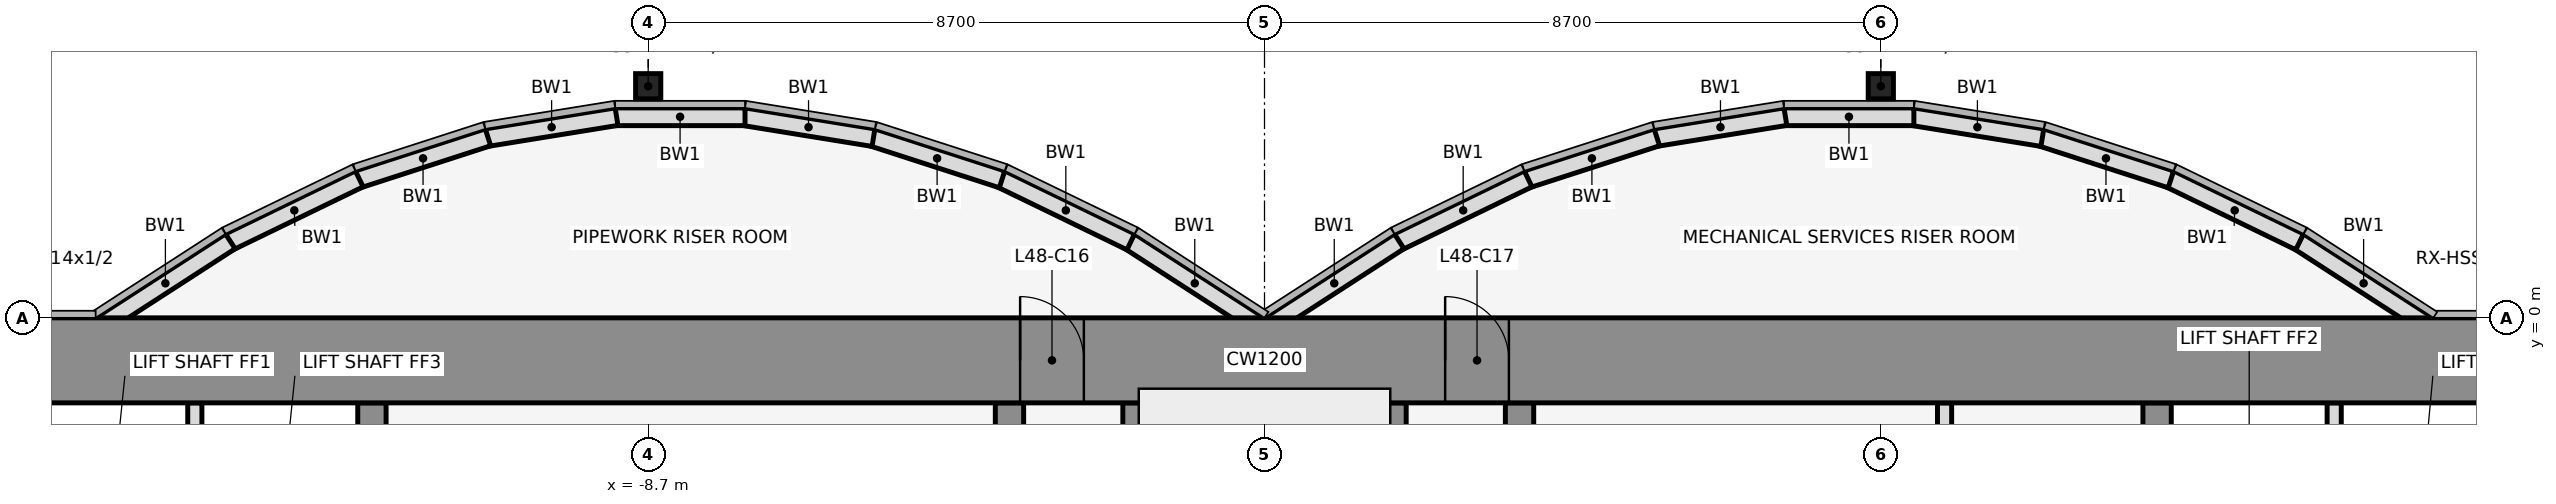
"""IFC4 building model, lengths in metres.
Left out: names, types, materials, properties, quantities, classifications, styles, units other than length and angle.
Written with IfcOpenShell. Run it as: python <this file> out.ifc"""

import sys

from ifc_helpers import new_model, si_unit, direction, frame, frame_2d, origin, origin_2d, place, context, subcontext, project, spatial, rectangle, hollow_rectangle, extrude, element, fill, save


model = new_model("IFC4")
c1 = context("Model", 3, precision=1e-05, world=origin(), true_north=direction((0.0, 1.0)))
c2 = subcontext(c1, "Body", "Model", "MODEL_VIEW")
j1 = project(units=[si_unit("LENGTHUNIT", "METRE"), si_unit("PLANEANGLEUNIT", "RADIAN")], contexts=[c1])
p1 = place(None, origin())
s1 = spatial("IfcSite", under=j1, at=p1, CompositionType="ELEMENT")
p2 = place(p1, origin())
s2 = spatial("IfcBuilding", under=s1, at=p2, CompositionType="ELEMENT")
p3 = place(p2, frame((0.0, 0.0, 215.5)))
s3 = spatial("IfcBuildingStorey", under=s2, at=p3, CompositionType="ELEMENT", Elevation=215.5)
for number, where, z_axis, x_axis in (
    (1, (-8.7, 3.269, 0.0), (0.0, 0.0, 1.0), (1.0, 0.0, 0.0)),
    (2, (8.7, 3.269, 0.0), (0.0, 0.0, 1.0), (1.0, 0.0, 0.0)),
):
    element("IfcColumn", number, at=place(p3, frame(where, z_axis=z_axis, x_axis=x_axis)), inside=s3, PredefinedType="COLUMN", context=c2, shape_type="SweptSolid", body=[
        extrude(hollow_rectangle(XDim=0.356, YDim=0.356, WallThickness=0.012, at=origin_2d()), origin(), (0.0, 0.0, 1.0), 4.1),
    ])
p4 = place(p3, frame((16.432, -0.105, 0.0), z_axis=(0.0, 0.0, 1.0), x_axis=(-0.83981312244, 0.542875602121, 0.0)))
e3 = element("IfcWall", 3, at=p4, inside=s3, PredefinedType="STANDARD", context=c2, shape_type="SweptSolid", body=[
    extrude(rectangle(XDim=2.183, YDim=0.25, at=frame_2d((1.091, 0.0))), origin(), (0.0, 0.0, 1.0), 3.95),
])
p5 = place(p3, frame((14.612, 1.073, 0.0), z_axis=(0.0, 0.0, 1.0), x_axis=(-0.89982408427, 0.436252928206, 0.0)))
e4 = element("IfcWall", 4, at=p5, inside=s3, PredefinedType="STANDARD", context=c2, shape_type="SweptSolid", body=[
    extrude(rectangle(XDim=2.038, YDim=0.25, at=frame_2d((1.019, 0.0))), origin(), (0.0, 0.0, 1.0), 3.95),
])
p6 = place(p3, frame((12.795, 1.955, 0.0), z_axis=(0.0, 0.0, 1.0), x_axis=(-0.951495806175, 0.307661714928, 0.0)))
e5 = element("IfcWall", 5, at=p6, inside=s3, PredefinedType="STANDARD", context=c2, shape_type="SweptSolid", body=[
    extrude(rectangle(XDim=1.927, YDim=0.25, at=frame_2d((0.963, 0.0))), origin(), (0.0, 0.0, 1.0), 3.95),
])
p7 = place(p3, frame((10.98, 2.543, 0.0), z_axis=(0.0, 0.0, 1.0), x_axis=(-0.987181718931, 0.159600293885, 0.0)))
e6 = element("IfcWall", 6, at=p7, inside=s3, PredefinedType="STANDARD", context=c2, shape_type="SweptSolid", body=[
    extrude(rectangle(XDim=1.857, YDim=0.25, at=frame_2d((0.929, 0.0))), origin(), (0.0, 0.0, 1.0), 3.95),
])
p8 = place(p3, frame((9.167, 2.838, 0.0), z_axis=(0.0, 0.0, 1.0), x_axis=(-1.0, 0.0, 0.0)))
e7 = element("IfcWall", 7, at=p8, inside=s3, PredefinedType="STANDARD", context=c2, shape_type="SweptSolid", body=[
    extrude(rectangle(XDim=1.833, YDim=0.25, at=frame_2d((0.917, 0.0))), origin(), (0.0, 0.0, 1.0), 3.95),
])
p9 = place(p3, frame((7.353, 2.84, 0.0), z_axis=(0.0, 0.0, 1.0), x_axis=(-0.987181718931, -0.159600293885, 0.0)))
e8 = element("IfcWall", 8, at=p9, inside=s3, PredefinedType="STANDARD", context=c2, shape_type="SweptSolid", body=[
    extrude(rectangle(XDim=1.857, YDim=0.25, at=frame_2d((0.929, 0.0))), origin(), (0.0, 0.0, 1.0), 3.95),
])
p10 = place(p3, frame((5.538, 2.548, 0.0), z_axis=(0.0, 0.0, 1.0), x_axis=(-0.951495806175, -0.307661714928, 0.0)))
e9 = element("IfcWall", 9, at=p10, inside=s3, PredefinedType="STANDARD", context=c2, shape_type="SweptSolid", body=[
    extrude(rectangle(XDim=1.927, YDim=0.25, at=frame_2d((0.963, 0.0))), origin(), (0.0, 0.0, 1.0), 3.95),
])
p11 = place(p3, frame((3.721, 1.962, 0.0), z_axis=(0.0, 0.0, 1.0), x_axis=(-0.89982408427, -0.436252928206, 0.0)))
e10 = element("IfcWall", 10, at=p11, inside=s3, PredefinedType="STANDARD", context=c2, shape_type="SweptSolid", body=[
    extrude(rectangle(XDim=2.038, YDim=0.25, at=frame_2d((1.019, 0.0))), origin(), (0.0, 0.0, 1.0), 3.95),
])
for number, where, z_axis, x_axis in (
    (11, (1.901, 1.08, 0.0), (0.0, 0.0, 1.0), (-0.84, -0.543, 0.0)),
    (12, (-0.068, -0.105, 0.0), (0.0, 0.0, 1.0), (-0.84, 0.543, 0.0)),
):
    element("IfcWall", number, at=place(p3, frame(where, z_axis=z_axis, x_axis=x_axis)), inside=s3, PredefinedType="STANDARD", context=c2, shape_type="SweptSolid", body=[
        extrude(rectangle(XDim=2.183, YDim=0.25, at=frame_2d((1.091, 0.0))), origin(), (0.0, 0.0, 1.0), 3.95),
    ])
p12 = place(p3, frame((-1.888, 1.073, 0.0), z_axis=(0.0, 0.0, 1.0), x_axis=(-0.89982408427, 0.436252928206, 0.0)))
e13 = element("IfcWall", 13, at=p12, inside=s3, PredefinedType="STANDARD", context=c2, shape_type="SweptSolid", body=[
    extrude(rectangle(XDim=2.038, YDim=0.25, at=frame_2d((1.019, 0.0))), origin(), (0.0, 0.0, 1.0), 3.95),
])
p13 = place(p3, frame((-3.705, 1.955, 0.0), z_axis=(0.0, 0.0, 1.0), x_axis=(-0.951495806175, 0.307661714928, 0.0)))
e14 = element("IfcWall", 14, at=p13, inside=s3, PredefinedType="STANDARD", context=c2, shape_type="SweptSolid", body=[
    extrude(rectangle(XDim=1.927, YDim=0.25, at=frame_2d((0.963, 0.0))), origin(), (0.0, 0.0, 1.0), 3.95),
])
p14 = place(p3, frame((-5.52, 2.543, 0.0), z_axis=(0.0, 0.0, 1.0), x_axis=(-0.987181718931, 0.159600293885, 0.0)))
e15 = element("IfcWall", 15, at=p14, inside=s3, PredefinedType="STANDARD", context=c2, shape_type="SweptSolid", body=[
    extrude(rectangle(XDim=1.857, YDim=0.25, at=frame_2d((0.929, 0.0))), origin(), (0.0, 0.0, 1.0), 3.95),
])
p15 = place(p3, frame((-7.333, 2.838, 0.0), z_axis=(0.0, 0.0, 1.0), x_axis=(-1.0, 0.0, 0.0)))
e16 = element("IfcWall", 16, at=p15, inside=s3, PredefinedType="STANDARD", context=c2, shape_type="SweptSolid", body=[
    extrude(rectangle(XDim=1.833, YDim=0.25, at=frame_2d((0.917, 0.0))), origin(), (0.0, 0.0, 1.0), 3.95),
])
p16 = place(p3, frame((-9.147, 2.84, 0.0), z_axis=(0.0, 0.0, 1.0), x_axis=(-0.987181718931, -0.159600293885, 0.0)))
e17 = element("IfcWall", 17, at=p16, inside=s3, PredefinedType="STANDARD", context=c2, shape_type="SweptSolid", body=[
    extrude(rectangle(XDim=1.857, YDim=0.25, at=frame_2d((0.929, 0.0))), origin(), (0.0, 0.0, 1.0), 3.95),
])
p17 = place(p3, frame((-10.962, 2.548, 0.0), z_axis=(0.0, 0.0, 1.0), x_axis=(-0.951495806175, -0.307661714928, 0.0)))
e18 = element("IfcWall", 18, at=p17, inside=s3, PredefinedType="STANDARD", context=c2, shape_type="SweptSolid", body=[
    extrude(rectangle(XDim=1.927, YDim=0.25, at=frame_2d((0.963, 0.0))), origin(), (0.0, 0.0, 1.0), 3.95),
])
p18 = place(p3, frame((-12.779, 1.962, 0.0), z_axis=(0.0, 0.0, 1.0), x_axis=(-0.89982408427, -0.436252928206, 0.0)))
e19 = element("IfcWall", 19, at=p18, inside=s3, PredefinedType="STANDARD", context=c2, shape_type="SweptSolid", body=[
    extrude(rectangle(XDim=2.038, YDim=0.25, at=frame_2d((1.019, 0.0))), origin(), (0.0, 0.0, 1.0), 3.95),
])
p19 = place(p3, frame((-14.599, 1.08, 0.0), z_axis=(0.0, 0.0, 1.0), x_axis=(-0.83981312244, -0.542875602121, 0.0)))
e20 = element("IfcWall", 20, at=p19, inside=s3, PredefinedType="STANDARD", context=c2, shape_type="SweptSolid", body=[
    extrude(rectangle(XDim=2.183, YDim=0.25, at=frame_2d((1.091, 0.0))), origin(), (0.0, 0.0, 1.0), 3.95),
])
p20 = place(p3, frame((-15.1, -4.6, 0.0), z_axis=(0.0, 0.0, 1.0), x_axis=(0.0, 1.0, 0.0)))
e21 = element("IfcWall", 21, at=p20, inside=s3, PredefinedType="PARTITIONING", context=c2, shape_type="SweptSolid", body=[
    extrude(rectangle(XDim=3.4, YDim=0.2, at=frame_2d((1.7, 0.0))), origin(), (0.0, 0.0, 1.0), 2.84),
])
p21 = place(p3, frame((-12.6, -11.8, 0.0), z_axis=(0.0, 0.0, 1.0), x_axis=(0.0, 1.0, 0.0)))
e22 = element("IfcWall", 22, at=p21, inside=s3, PredefinedType="SHEAR", context=c2, shape_type="SweptSolid", body=[
    extrude(rectangle(XDim=10.6, YDim=0.4, at=frame_2d((5.3, 0.0))), origin(), (0.0, 0.0, 1.0), 4.1),
])
p22 = place(p21, frame((4.75, 0.0, 0.0)))
e23 = element("IfcOpeningElement", 23, at=p22, cuts=e22, PredefinedType="OPENING", context=c2, shape_type="SweptSolid", body=[
    extrude(rectangle(XDim=1.1, YDim=2.1, at=frame_2d((0.55, 1.05))), frame((0.0, 0.212, 0.0), z_axis=(0.0, -1.0, 0.0), x_axis=(1.0, 0.0, 0.0)), (0.0, 0.0, 1.0), 0.424),
])
p23 = place(p3, frame((-3.6, -11.8, 0.0), z_axis=(0.0, 0.0, 1.0), x_axis=(0.0, 1.0, 0.0)))
e24 = element("IfcWall", 24, at=p23, inside=s3, PredefinedType="SHEAR", context=c2, shape_type="SweptSolid", body=[
    extrude(rectangle(XDim=10.6, YDim=0.4, at=frame_2d((5.3, 0.0))), origin(), (0.0, 0.0, 1.0), 4.1),
])
p24 = place(p23, frame((4.85, 0.0, 0.0)))
e25 = element("IfcOpeningElement", 25, at=p24, cuts=e24, PredefinedType="OPENING", context=c2, shape_type="SweptSolid", body=[
    extrude(rectangle(XDim=0.9, YDim=2.1, at=frame_2d((0.45, 1.05))), frame((0.0, 0.212, 0.0), z_axis=(0.0, -1.0, 0.0), x_axis=(1.0, 0.0, 0.0)), (0.0, 0.0, 1.0), 0.424),
])
for number, where, z_axis, x_axis in (
    (26, (-1.8, -11.8, 0.0), (0.0, 0.0, 1.0), (0.0, 1.0, 0.0)),
    (27, (1.8, -11.8, 0.0), (0.0, 0.0, 1.0), (0.0, 1.0, 0.0)),
):
    element("IfcWall", number, at=place(p3, frame(where, z_axis=z_axis, x_axis=x_axis)), inside=s3, PredefinedType="SHEAR", context=c2, shape_type="SweptSolid", body=[
        extrude(rectangle(XDim=10.6, YDim=0.4, at=frame_2d((5.3, 0.0))), origin(), (0.0, 0.0, 1.0), 4.1),
    ])
p25 = place(p3, frame((3.6, -11.8, 0.0), z_axis=(0.0, 0.0, 1.0), x_axis=(0.0, 1.0, 0.0)))
e28 = element("IfcWall", 28, at=p25, inside=s3, PredefinedType="SHEAR", context=c2, shape_type="SweptSolid", body=[
    extrude(rectangle(XDim=10.6, YDim=0.4, at=frame_2d((5.3, 0.0))), origin(), (0.0, 0.0, 1.0), 4.1),
])
p26 = place(p25, frame((1.35, 0.0, 0.0)))
e29 = element("IfcOpeningElement", 29, at=p26, cuts=e28, PredefinedType="OPENING", context=c2, shape_type="SweptSolid", body=[
    extrude(rectangle(XDim=0.9, YDim=2.1, at=frame_2d((0.45, 1.05))), frame((0.0, 0.212, 0.0), z_axis=(0.0, -1.0, 0.0), x_axis=(1.0, 0.0, 0.0)), (0.0, 0.0, 1.0), 0.424),
])
p27 = place(p3, frame((9.6, -4.6, 0.0), z_axis=(0.0, 0.0, 1.0), x_axis=(0.0, 1.0, 0.0)))
e30 = element("IfcWall", 30, at=p27, inside=s3, PredefinedType="PARTITIONING", context=c2, shape_type="SweptSolid", body=[
    extrude(rectangle(XDim=3.4, YDim=0.2, at=frame_2d((1.7, 0.0))), origin(), (0.0, 0.0, 1.0), 2.84),
])
p28 = place(p3, frame((12.6, -11.8, 0.0), z_axis=(0.0, 0.0, 1.0), x_axis=(0.0, 1.0, 0.0)))
e31 = element("IfcWall", 31, at=p28, inside=s3, PredefinedType="SHEAR", context=c2, shape_type="SweptSolid", body=[
    extrude(rectangle(XDim=10.6, YDim=0.4, at=frame_2d((5.3, 0.0))), origin(), (0.0, 0.0, 1.0), 4.1),
])
p29 = place(p28, frame((1.25, 0.0, 0.0)))
e32 = element("IfcOpeningElement", 32, at=p29, cuts=e31, PredefinedType="OPENING", context=c2, shape_type="SweptSolid", body=[
    extrude(rectangle(XDim=1.2, YDim=2.1, at=frame_2d((0.6, 1.05))), frame((0.0, 0.212, 0.0), z_axis=(0.0, -1.0, 0.0), x_axis=(1.0, 0.0, 0.0)), (0.0, 0.0, 1.0), 0.424),
])
p30 = place(p28, frame((4.75, 0.0, 0.0)))
e33 = element("IfcOpeningElement", 33, at=p30, cuts=e31, PredefinedType="OPENING", context=c2, shape_type="SweptSolid", body=[
    extrude(rectangle(XDim=1.1, YDim=2.1, at=frame_2d((0.55, 1.05))), frame((0.0, 0.212, 0.0), z_axis=(0.0, -1.0, 0.0), x_axis=(1.0, 0.0, 0.0)), (0.0, 0.0, 1.0), 0.424),
])
p31 = place(p3, frame((15.1, -4.6, 0.0), z_axis=(0.0, 0.0, 1.0), x_axis=(0.0, 1.0, 0.0)))
e34 = element("IfcWall", 34, at=p31, inside=s3, PredefinedType="PARTITIONING", context=c2, shape_type="SweptSolid", body=[
    extrude(rectangle(XDim=3.4, YDim=0.2, at=frame_2d((1.7, 0.0))), origin(), (0.0, 0.0, 1.0), 2.84),
])
p32 = place(p3, frame((-22.0, -0.6, 0.0), z_axis=(0.0, 0.0, 1.0), x_axis=(1.0, 0.0, 0.0)))
e35 = element("IfcWall", 35, at=p32, inside=s3, PredefinedType="SHEAR", context=c2, shape_type="SweptSolid", body=[
    extrude(rectangle(XDim=44.0, YDim=1.2, at=frame_2d((22.0, 0.0))), origin(), (0.0, 0.0, 1.0), 4.1),
])
p33 = place(p32, frame((18.55, 0.0, 0.0)))
e36 = element("IfcOpeningElement", 36, at=p33, cuts=e35, PredefinedType="OPENING", context=c2, shape_type="SweptSolid", body=[
    extrude(rectangle(XDim=0.9, YDim=2.1, at=frame_2d((0.45, 1.05))), frame((0.0, 0.612, 0.0), z_axis=(0.0, -1.0, 0.0), x_axis=(1.0, 0.0, 0.0)), (0.0, 0.0, 1.0), 1.224),
])
p34 = place(p32, frame((24.55, 0.0, 0.0)))
e37 = element("IfcOpeningElement", 37, at=p34, cuts=e35, PredefinedType="OPENING", context=c2, shape_type="SweptSolid", body=[
    extrude(rectangle(XDim=0.9, YDim=2.1, at=frame_2d((0.45, 1.05))), frame((0.0, 0.612, 0.0), z_axis=(0.0, -1.0, 0.0), x_axis=(1.0, 0.0, 0.0)), (0.0, 0.0, 1.0), 1.224),
])
p35 = place(p33, origin())
e38 = element("IfcDoor", 38, at=p35, inside=s3, OperationType="SINGLE_SWING_LEFT", PredefinedType="DOOR", context=c2, shape_type="SweptSolid", body=[
    extrude(rectangle(XDim=0.9, YDim=2.1, at=frame_2d((0.45, 1.05))), frame((0.0, 0.025, 0.0), z_axis=(0.0, -1.0, 0.0), x_axis=(1.0, 0.0, 0.0)), (0.0, 0.0, 1.0), 0.05),
])
fill(e36, e38)
p36 = place(p34, origin())
e39 = element("IfcDoor", 39, at=p36, inside=s3, OperationType="SINGLE_SWING_LEFT", PredefinedType="DOOR", context=c2, shape_type="SweptSolid", body=[
    extrude(rectangle(XDim=0.9, YDim=2.1, at=frame_2d((0.45, 1.05))), frame((0.0, 0.025, 0.0), z_axis=(0.0, -1.0, 0.0), x_axis=(1.0, 0.0, 0.0)), (0.0, 0.0, 1.0), 0.05),
])
fill(e37, e39)
save(model, sys.argv[1])
